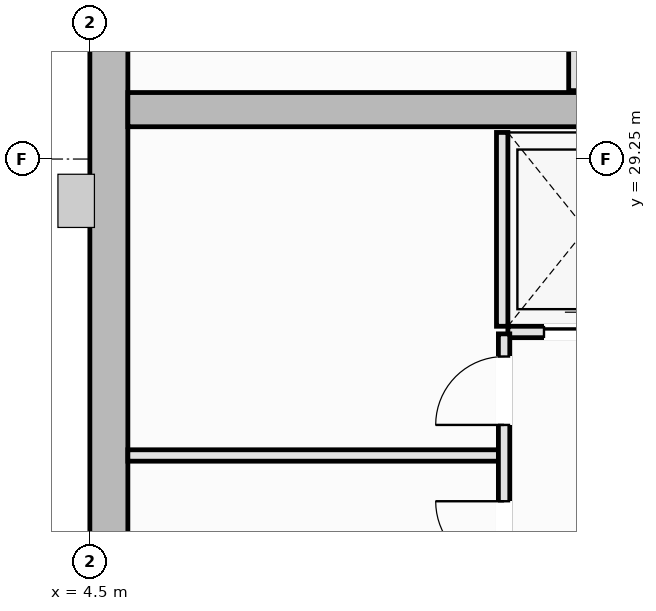
"""IFC4 building model, lengths in metres.
Left out: names, types, materials, properties, quantities, classifications, styles, units other than length and angle.
Written with IfcOpenShell. Run it as: python <this file> out.ifc"""

import sys

from ifc_helpers import new_model, si_unit, direction, frame, frame_2d, origin, place, context, subcontext, project, spatial, rectangle, extrude, element, fill, save


model = new_model("IFC4")
c1 = context("Model", 3, precision=1e-05, world=origin(), true_north=direction((0.0, 1.0)))
c2 = subcontext(c1, "Body", "Model", "MODEL_VIEW")
j1 = project(units=[si_unit("LENGTHUNIT", "METRE"), si_unit("PLANEANGLEUNIT", "RADIAN")], contexts=[c1])
p1 = place(None, origin())
s1 = spatial("IfcSite", under=j1, at=p1, CompositionType="ELEMENT")
p2 = place(p1, origin())
s2 = spatial("IfcBuilding", under=s1, at=p2, CompositionType="ELEMENT")
p3 = place(p2, frame((0.0, 0.0, 284.75)))
s3 = spatial("IfcBuildingStorey", under=s2, at=p3, CompositionType="ELEMENT", Elevation=284.75)
p4 = place(p3, frame((4.75, 14.5, 0.0), z_axis=(0.0, 0.0, 1.0), x_axis=(0.0, 1.0, 0.0)))
e1 = element("IfcWall", 1, at=p4, inside=s3, PredefinedType="SHEAR", context=c2, shape_type="SweptSolid", body=[
    extrude(rectangle(XDim=21.5, YDim=0.5, at=frame_2d((10.75, 0.0))), origin(), (0.0, 0.0, 1.0), 3.55),
])
p5 = place(p3, frame((5.0, 29.9, 0.0), z_axis=(0.0, 0.0, 1.0), x_axis=(1.0, 0.0, 0.0)))
e2 = element("IfcWall", 2, at=p5, inside=s3, PredefinedType="SHEAR", context=c2, shape_type="SweptSolid", body=[
    extrude(rectangle(XDim=12.5, YDim=0.45, at=frame_2d((6.25, 0.0))), origin(), (0.0, 0.0, 1.0), 3.55),
])
p6 = place(p3, frame((10.0, 26.975, 0.0), z_axis=(0.0, 0.0, 1.0), x_axis=(1.0, 0.0, 0.0)))
e3 = element("IfcWall", 3, at=p6, inside=s3, PredefinedType="PARTITIONING", context=c2, shape_type="SweptSolid", body=[
    extrude(rectangle(XDim=2.05, YDim=0.15, at=frame_2d((1.025, 0.0))), origin(), (0.0, 0.0, 1.0), 3.39),
])
p7 = place(p6, frame((0.475, 0.0, 0.0)))
e4 = element("IfcOpeningElement", 4, at=p7, cuts=e3, PredefinedType="OPENING", context=c2, shape_type="SweptSolid", body=[
    extrude(rectangle(XDim=1.1, YDim=2.2, at=frame_2d((0.55, 1.1))), frame((0.0, 0.085, 0.0), z_axis=(0.0, -1.0, 0.0), x_axis=(1.0, 0.0, 0.0)), (0.0, 0.0, 1.0), 0.17),
])
p8 = place(p3, frame((9.925, 27.05, 0.0), z_axis=(0.0, 0.0, 1.0), x_axis=(0.0, 1.0, 0.0)))
e5 = element("IfcWall", 5, at=p8, inside=s3, PredefinedType="PARTITIONING", context=c2, shape_type="SweptSolid", body=[
    extrude(rectangle(XDim=2.55, YDim=0.15, at=frame_2d((1.275, 0.0))), origin(), (0.0, 0.0, 1.0), 3.39),
])
p9 = place(p3, frame((10.875, 30.15, 0.0), z_axis=(0.0, 0.0, 1.0), x_axis=(0.0, 1.0, 0.0)))
e6 = element("IfcWall", 6, at=p9, inside=s3, PredefinedType="PARTITIONING", context=c2, shape_type="SweptSolid", body=[
    extrude(rectangle(XDim=1.8, YDim=0.15, at=frame_2d((0.9, 0.0))), origin(), (0.0, 0.0, 1.0), 3.39),
])
p10 = place(p3, frame((5.0, 25.35, 0.0), z_axis=(0.0, 0.0, 1.0), x_axis=(1.0, 0.0, 0.0)))
e7 = element("IfcWall", 7, at=p10, inside=s3, PredefinedType="PARTITIONING", context=c2, shape_type="SweptSolid", body=[
    extrude(rectangle(XDim=4.95, YDim=0.15, at=frame_2d((2.475, 0.0))), origin(), (0.0, 0.0, 1.0), 3.39),
])
p11 = place(p3, frame((9.95, 23.55, 0.0), z_axis=(0.0, 0.0, 1.0), x_axis=(0.0, 1.0, 0.0)))
e8 = element("IfcWall", 8, at=p11, inside=s3, PredefinedType="PARTITIONING", context=c2, shape_type="SweptSolid", body=[
    extrude(rectangle(XDim=3.4, YDim=0.15, at=frame_2d((1.7, 0.0))), origin(), (0.0, 0.0, 1.0), 3.39),
])
p12 = place(p11, frame((0.298, 0.0, 0.0)))
e9 = element("IfcOpeningElement", 9, at=p12, cuts=e8, PredefinedType="OPENING", context=c2, shape_type="SweptSolid", body=[
    extrude(rectangle(XDim=0.9, YDim=2.1, at=frame_2d((0.45, 1.05))), frame((0.0, 0.085, 0.0), z_axis=(0.0, -1.0, 0.0), x_axis=(1.0, 0.0, 0.0)), (0.0, 0.0, 1.0), 0.17),
])
p13 = place(p11, frame((2.202, 0.0, 0.0)))
e10 = element("IfcOpeningElement", 10, at=p13, cuts=e8, PredefinedType="OPENING", context=c2, shape_type="SweptSolid", body=[
    extrude(rectangle(XDim=0.9, YDim=2.1, at=frame_2d((0.45, 1.05))), frame((0.0, 0.085, 0.0), z_axis=(0.0, -1.0, 0.0), x_axis=(1.0, 0.0, 0.0)), (0.0, 0.0, 1.0), 0.17),
])
p14 = place(p7, origin())
e11 = element("IfcDoor", 11, at=p14, inside=s3, OperationType="DOUBLE_DOOR_SLIDING", PredefinedType="DOOR", context=c2, shape_type="SweptSolid", body=[
    extrude(rectangle(XDim=1.1, YDim=2.2, at=frame_2d((0.55, 1.1))), frame((0.0, 0.025, 0.0), z_axis=(0.0, -1.0, 0.0), x_axis=(1.0, 0.0, 0.0)), (0.0, 0.0, 1.0), 0.05),
])
fill(e4, e11)
p15 = place(p12, origin())
e12 = element("IfcDoor", 12, at=p15, inside=s3, OperationType="SINGLE_SWING_RIGHT", PredefinedType="DOOR", context=c2, shape_type="SweptSolid", body=[
    extrude(rectangle(XDim=0.9, YDim=2.1, at=frame_2d((0.45, 1.05))), frame((0.0, 0.025, 0.0), z_axis=(0.0, -1.0, 0.0), x_axis=(1.0, 0.0, 0.0)), (0.0, 0.0, 1.0), 0.05),
])
fill(e9, e12)
p16 = place(p13, origin())
e13 = element("IfcDoor", 13, at=p16, inside=s3, OperationType="SINGLE_SWING_LEFT", PredefinedType="DOOR", context=c2, shape_type="SweptSolid", body=[
    extrude(rectangle(XDim=0.9, YDim=2.1, at=frame_2d((0.45, 1.05))), frame((0.0, 0.025, 0.0), z_axis=(0.0, -1.0, 0.0), x_axis=(1.0, 0.0, 0.0)), (0.0, 0.0, 1.0), 0.05),
])
fill(e10, e13)
save(model, sys.argv[1])
